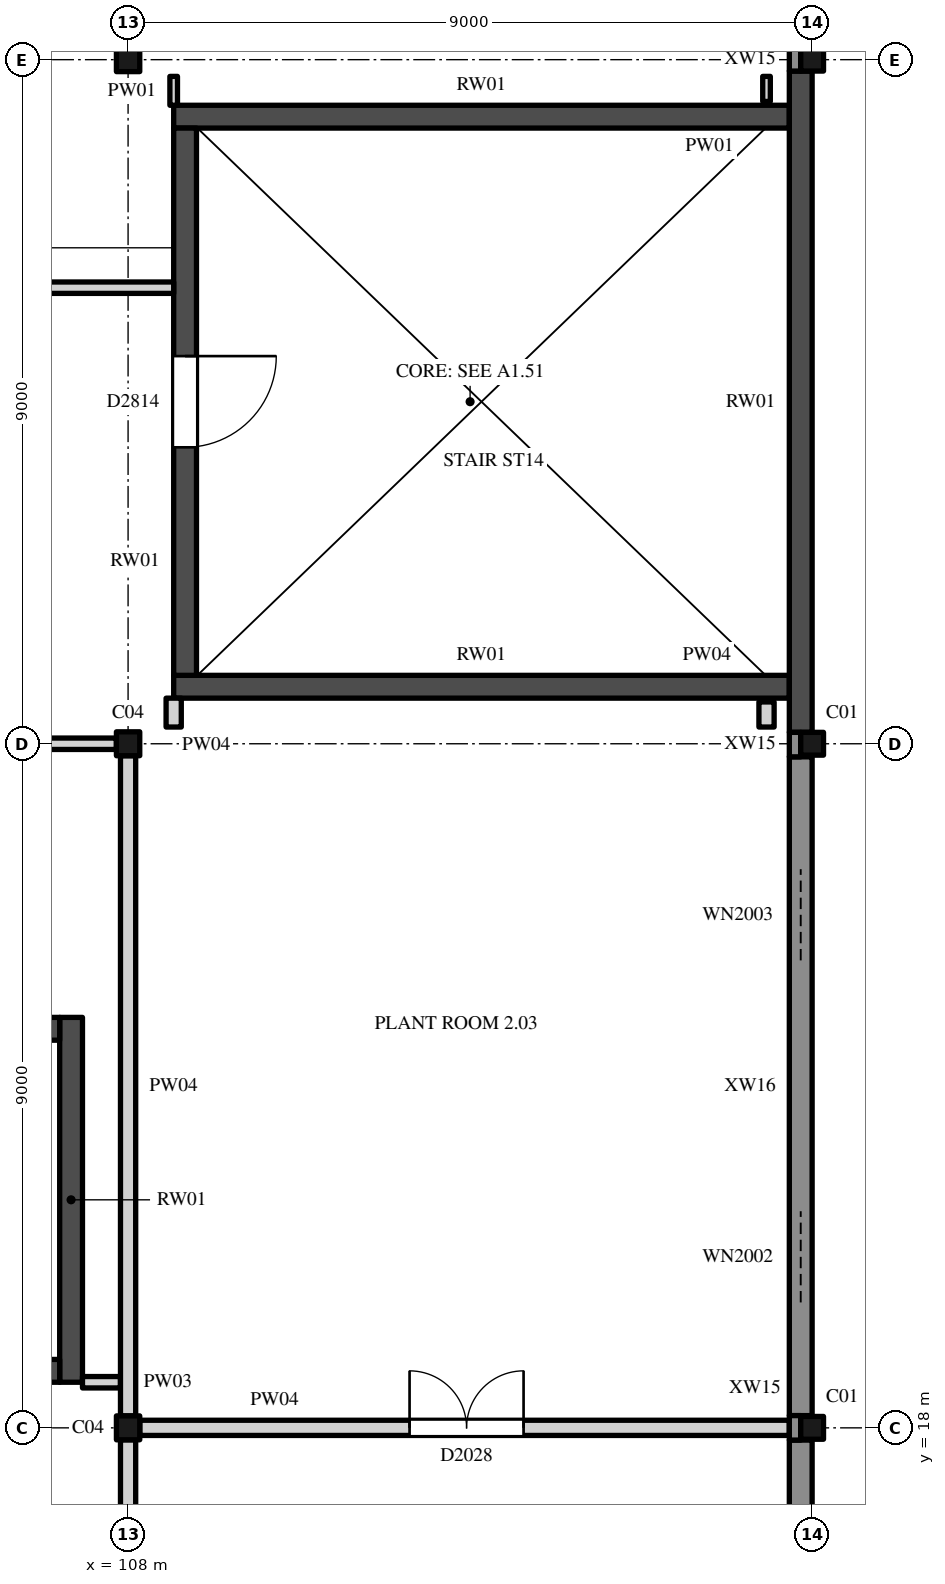
"""IFC4 building model, lengths in metres.
Left out: names, types, materials, properties, quantities, classifications, styles, units other than length and angle.
Written with IfcOpenShell. Run it as: python <this file> out.ifc"""

import sys

from ifc_helpers import new_model, si_unit, direction, frame, frame_2d, origin, origin_2d, place, context, subcontext, project, spatial, rectangle, hollow_rectangle, i_section, extrude, element, fill, save


model = new_model("IFC4")
c1 = context("Model", 3, precision=1e-05, world=origin(), true_north=direction((0.0, 1.0)))
c2 = subcontext(c1, "Body", "Model", "MODEL_VIEW")
j1 = project(units=[si_unit("LENGTHUNIT", "METRE"), si_unit("PLANEANGLEUNIT", "RADIAN")], contexts=[c1])
p1 = place(None, origin())
s1 = spatial("IfcSite", under=j1, at=p1, CompositionType="ELEMENT")
p2 = place(p1, origin())
s2 = spatial("IfcBuilding", under=s1, at=p2, CompositionType="ELEMENT")
p3 = place(p2, frame((0.0, 0.0, 11.0)))
s3 = spatial("IfcBuildingStorey", under=s2, at=p3, CompositionType="ELEMENT", Elevation=11.0)
p4 = place(p3, frame((108.0, 18.0, 0.0), z_axis=(0.0, 0.0, 1.0), x_axis=(1.0, 0.0, 0.0)))
e1 = element("IfcColumn", 1, at=p4, inside=s3, PredefinedType="COLUMN", context=c2, shape_type="SweptSolid", body=[
    extrude(i_section(OverallWidth=0.307, OverallDepth=0.315, WebThickness=0.012, FlangeThickness=0.019, FilletRadius=0.017, at=origin_2d()), origin(), (0.0, 0.0, 1.0), 5.0),
])
p5 = place(p3, frame((117.0, 18.0, 0.0), z_axis=(0.0, 0.0, 1.0), x_axis=(1.0, 0.0, 0.0)))
e2 = element("IfcColumn", 2, at=p5, inside=s3, PredefinedType="COLUMN", context=c2, shape_type="SweptSolid", body=[
    extrude(hollow_rectangle(XDim=0.3, YDim=0.3, WallThickness=0.012, InnerFilletRadius=0.019, OuterFilletRadius=0.031, at=origin_2d()), origin(), (0.0, 0.0, 1.0), 5.0),
])
p6 = place(p3, frame((108.0, 27.0, 0.0), z_axis=(0.0, 0.0, 1.0), x_axis=(1.0, 0.0, 0.0)))
e3 = element("IfcColumn", 3, at=p6, inside=s3, PredefinedType="COLUMN", context=c2, shape_type="SweptSolid", body=[
    extrude(i_section(OverallWidth=0.307, OverallDepth=0.315, WebThickness=0.012, FlangeThickness=0.019, FilletRadius=0.017, at=origin_2d()), origin(), (0.0, 0.0, 1.0), 5.0),
])
p7 = place(p3, frame((117.0, 27.0, 0.0), z_axis=(0.0, 0.0, 1.0), x_axis=(1.0, 0.0, 0.0)))
e4 = element("IfcColumn", 4, at=p7, inside=s3, PredefinedType="COLUMN", context=c2, shape_type="SweptSolid", body=[
    extrude(hollow_rectangle(XDim=0.3, YDim=0.3, WallThickness=0.012, InnerFilletRadius=0.019, OuterFilletRadius=0.031, at=origin_2d()), origin(), (0.0, 0.0, 1.0), 5.0),
])
p8 = place(p3, frame((108.0, 36.0, 0.0), z_axis=(0.0, 0.0, 1.0), x_axis=(1.0, 0.0, 0.0)))
e5 = element("IfcColumn", 5, at=p8, inside=s3, PredefinedType="COLUMN", context=c2, shape_type="SweptSolid", body=[
    extrude(i_section(OverallWidth=0.307, OverallDepth=0.315, WebThickness=0.012, FlangeThickness=0.019, FilletRadius=0.017, at=origin_2d()), origin(), (0.0, 0.0, 1.0), 5.0),
])
p9 = place(p3, frame((117.0, 36.0, 0.0), z_axis=(0.0, 0.0, 1.0), x_axis=(1.0, 0.0, 0.0)))
e6 = element("IfcColumn", 6, at=p9, inside=s3, PredefinedType="COLUMN", context=c2, shape_type="SweptSolid", body=[
    extrude(hollow_rectangle(XDim=0.3, YDim=0.3, WallThickness=0.012, InnerFilletRadius=0.019, OuterFilletRadius=0.031, at=origin_2d()), origin(), (0.0, 0.0, 1.0), 5.0),
])
for number, where, z_axis, x_axis in (
    (7, (108.6, 27.75, 0.0), (0.0, 0.0, 1.0), (1.0, 0.0, 0.0)),
    (8, (108.6, 35.25, 0.0), (0.0, 0.0, 1.0), (1.0, 0.0, 0.0)),
):
    element("IfcWall", number, at=place(p3, frame(where, z_axis=z_axis, x_axis=x_axis)), inside=s3, PredefinedType="SHEAR", context=c2, shape_type="SweptSolid", body=[
        extrude(rectangle(XDim=8.1, YDim=0.3, at=frame_2d((4.05, 0.0))), origin(), (0.0, 0.0, 1.0), 4.825),
    ])
p10 = place(p3, frame((108.75, 27.9, 0.0), z_axis=(0.0, 0.0, 1.0), x_axis=(0.0, 1.0, 0.0)))
e9 = element("IfcWall", 9, at=p10, inside=s3, PredefinedType="SHEAR", context=c2, shape_type="SweptSolid", body=[
    extrude(rectangle(XDim=7.2, YDim=0.3, at=frame_2d((3.6, 0.0))), origin(), (0.0, 0.0, 1.0), 4.825),
])
p11 = place(p10, frame((3.0, 0.0, 0.0)))
e10 = element("IfcOpeningElement", 10, at=p11, cuts=e9, PredefinedType="OPENING", context=c2, shape_type="SweptSolid", body=[
    extrude(rectangle(XDim=1.2, YDim=2.1, at=frame_2d((0.6, 1.05))), frame((0.0, 0.16, 0.0), z_axis=(0.0, -1.0, 0.0), x_axis=(1.0, 0.0, 0.0)), (0.0, 0.0, 1.0), 0.32),
])
p12 = place(p3, frame((116.85, 27.15, 0.0), z_axis=(0.0, 0.0, 1.0), x_axis=(0.0, 1.0, 0.0)))
e11 = element("IfcWall", 11, at=p12, inside=s3, PredefinedType="SHEAR", context=c2, shape_type="SweptSolid", body=[
    extrude(rectangle(XDim=8.7, YDim=0.3, at=frame_2d((4.35, 0.0))), origin(), (0.0, 0.0, 1.0), 4.825),
])
p13 = place(p3, frame((107.25, 18.6, 0.0), z_axis=(0.0, 0.0, 1.0), x_axis=(0.0, 1.0, 0.0)))
e12 = element("IfcWall", 12, at=p13, inside=s3, PredefinedType="SHEAR", context=c2, shape_type="SweptSolid", body=[
    extrude(rectangle(XDim=4.8, YDim=0.3, at=frame_2d((2.4, 0.0))), origin(), (0.0, 0.0, 1.0), 4.825),
])
p14 = place(p3, frame((103.65, 18.75, 0.0), z_axis=(0.0, 0.0, 1.0), x_axis=(1.0, 0.0, 0.0)))
e13 = element("IfcWall", 13, at=p14, inside=s3, PredefinedType="SHEAR", context=c2, shape_type="SweptSolid", body=[
    extrude(rectangle(XDim=3.45, YDim=0.3, at=frame_2d((1.725, 0.0))), origin(), (0.0, 0.0, 1.0), 4.825),
])
p15 = place(p14, frame((0.75, 0.0, 0.0)))
e14 = element("IfcOpeningElement", 14, at=p15, cuts=e13, PredefinedType="OPENING", context=c2, shape_type="SweptSolid", body=[
    extrude(rectangle(XDim=2.1, YDim=2.4, at=frame_2d((1.05, 1.2))), frame((0.0, 0.16, 0.0), z_axis=(0.0, -1.0, 0.0), x_axis=(1.0, 0.0, 0.0)), (0.0, 0.0, 1.0), 0.32),
])
p16 = place(p3, frame((103.65, 23.25, 0.0), z_axis=(0.0, 0.0, 1.0), x_axis=(1.0, 0.0, 0.0)))
e15 = element("IfcWall", 15, at=p16, inside=s3, PredefinedType="SHEAR", context=c2, shape_type="SweptSolid", body=[
    extrude(rectangle(XDim=3.45, YDim=0.3, at=frame_2d((1.725, 0.0))), origin(), (0.0, 0.0, 1.0), 4.825),
])
p17 = place(p3, frame((116.85, 9.172, 0.0), z_axis=(0.0, 0.0, 1.0), x_axis=(0.0, 1.0, 0.0)))
e16 = element("IfcWall", 16, at=p17, inside=s3, PredefinedType="SOLIDWALL", context=c2, shape_type="SweptSolid", body=[
    extrude(rectangle(XDim=8.667, YDim=0.3, at=frame_2d((4.333, 0.0))), origin(), (0.0, 0.0, 1.0), 4.825),
])
p18 = place(p17, frame((3.128, 0.0, 0.9)))
e17 = element("IfcOpeningElement", 17, at=p18, cuts=e16, PredefinedType="OPENING", context=c2, shape_type="SweptSolid", body=[
    extrude(rectangle(XDim=2.4, YDim=1.8, at=frame_2d((1.2, 0.9))), frame((0.0, 0.16, 0.0), z_axis=(0.0, -1.0, 0.0), x_axis=(1.0, 0.0, 0.0)), (0.0, 0.0, 1.0), 0.32),
])
p19 = place(p3, frame((116.85, 18.161, 0.0), z_axis=(0.0, 0.0, 1.0), x_axis=(0.0, 1.0, 0.0)))
e18 = element("IfcWall", 18, at=p19, inside=s3, PredefinedType="SOLIDWALL", context=c2, shape_type="SweptSolid", body=[
    extrude(rectangle(XDim=8.667, YDim=0.3, at=frame_2d((4.333, 0.0))), origin(), (0.0, 0.0, 1.0), 4.825),
])
p20 = place(p19, frame((1.489, 0.0, 1.2)))
e19 = element("IfcOpeningElement", 19, at=p20, cuts=e18, PredefinedType="OPENING", context=c2, shape_type="SweptSolid", body=[
    extrude(rectangle(XDim=1.2, YDim=1.5, at=frame_2d((0.6, 0.75))), frame((0.0, 0.16, 0.0), z_axis=(0.0, -1.0, 0.0), x_axis=(1.0, 0.0, 0.0)), (0.0, 0.0, 1.0), 0.32),
])
p21 = place(p19, frame((5.989, 0.0, 1.2)))
e20 = element("IfcOpeningElement", 20, at=p21, cuts=e18, PredefinedType="OPENING", context=c2, shape_type="SweptSolid", body=[
    extrude(rectangle(XDim=1.2, YDim=1.5, at=frame_2d((0.6, 0.75))), frame((0.0, 0.16, 0.0), z_axis=(0.0, -1.0, 0.0), x_axis=(1.0, 0.0, 0.0)), (0.0, 0.0, 1.0), 0.32),
])
p22 = place(p3, frame((116.775, 17.839, 0.0), z_axis=(0.0, 0.0, 1.0), x_axis=(0.0, 1.0, 0.0)))
e21 = element("IfcWall", 21, at=p22, inside=s3, PredefinedType="SOLIDWALL", context=c2, shape_type="SweptSolid", body=[
    extrude(rectangle(XDim=0.322, YDim=0.15, at=frame_2d((0.161, 0.0))), origin(), (0.0, 0.0, 1.0), 4.825),
])
for number, where, z_axis, x_axis in (
    (22, (116.775, 26.828, 0.0), (0.0, 0.0, 1.0), (0.0, 1.0, 0.0)),
    (23, (116.775, 35.85, 0.0), (0.0, 0.0, 1.0), (0.0, 1.0, 0.0)),
):
    element("IfcWall", number, at=place(p3, frame(where, z_axis=z_axis, x_axis=x_axis)), inside=s3, PredefinedType="SOLIDWALL", context=c2, shape_type="SweptSolid", body=[
        extrude(rectangle(XDim=0.322, YDim=0.15, at=frame_2d((0.161, 0.0))), origin(), (0.0, 0.0, 1.0), 4.825),
    ])
for number, where, z_axis, x_axis in (
    (24, (109.5, 20.325, 5.0), (0.0, 0.0, 1.0), (1.0, 0.0, 0.0)),
    (25, (109.5, 24.675, 5.0), (0.0, 0.0, 1.0), (1.0, 0.0, 0.0)),
):
    element("IfcWall", number, at=place(p3, frame(where, z_axis=z_axis, x_axis=x_axis)), inside=s3, PredefinedType="PARAPET", context=c2, shape_type="SweptSolid", body=[
        extrude(rectangle(XDim=6.0, YDim=0.15, at=frame_2d((3.0, 0.0))), origin(), (0.0, 0.0, 1.0), 0.5),
    ])
for number, where, z_axis, x_axis in (
    (26, (109.575, 20.4, 5.0), (0.0, 0.0, 1.0), (0.0, 1.0, 0.0)),
    (27, (115.425, 20.4, 5.0), (0.0, 0.0, 1.0), (0.0, 1.0, 0.0)),
):
    element("IfcWall", number, at=place(p3, frame(where, z_axis=z_axis, x_axis=x_axis)), inside=s3, PredefinedType="PARAPET", context=c2, shape_type="SweptSolid", body=[
        extrude(rectangle(XDim=4.2, YDim=0.15, at=frame_2d((2.1, 0.0))), origin(), (0.0, 0.0, 1.0), 0.5),
    ])
for number, where, z_axis, x_axis in (
    (28, (109.5, 29.325, 5.0), (0.0, 0.0, 1.0), (1.0, 0.0, 0.0)),
    (29, (109.5, 33.675, 5.0), (0.0, 0.0, 1.0), (1.0, 0.0, 0.0)),
):
    element("IfcWall", number, at=place(p3, frame(where, z_axis=z_axis, x_axis=x_axis)), inside=s3, PredefinedType="PARAPET", context=c2, shape_type="SweptSolid", body=[
        extrude(rectangle(XDim=6.0, YDim=0.15, at=frame_2d((3.0, 0.0))), origin(), (0.0, 0.0, 1.0), 0.5),
    ])
for number, where, z_axis, x_axis in (
    (30, (109.575, 29.4, 5.0), (0.0, 0.0, 1.0), (0.0, 1.0, 0.0)),
    (31, (115.425, 29.4, 5.0), (0.0, 0.0, 1.0), (0.0, 1.0, 0.0)),
):
    element("IfcWall", number, at=place(p3, frame(where, z_axis=z_axis, x_axis=x_axis)), inside=s3, PredefinedType="PARAPET", context=c2, shape_type="SweptSolid", body=[
        extrude(rectangle(XDim=4.2, YDim=0.15, at=frame_2d((2.1, 0.0))), origin(), (0.0, 0.0, 1.0), 0.5),
    ])
p23 = place(p3, frame((108.154, 18.0, 0.0), z_axis=(0.0, 0.0, 1.0), x_axis=(1.0, 0.0, 0.0)))
e32 = element("IfcWall", 32, at=p23, inside=s3, PredefinedType="PARTITIONING", context=c2, shape_type="SweptSolid", body=[
    extrude(rectangle(XDim=8.546, YDim=0.2, at=frame_2d((4.273, 0.0))), origin(), (0.0, 0.0, 1.0), 4.419),
])
p24 = place(p23, frame((3.55, 0.0, 0.0)))
e33 = element("IfcOpeningElement", 33, at=p24, cuts=e32, PredefinedType="OPENING", context=c2, shape_type="SweptSolid", body=[
    extrude(rectangle(XDim=1.5, YDim=2.4, at=frame_2d((0.75, 1.2))), frame((0.0, 0.11, 0.0), z_axis=(0.0, -1.0, 0.0), x_axis=(1.0, 0.0, 0.0)), (0.0, 0.0, 1.0), 0.22),
])
p25 = place(p3, frame((107.4, 18.6, 0.0), z_axis=(0.0, 0.0, 1.0), x_axis=(1.0, 0.0, 0.0)))
e34 = element("IfcWall", 34, at=p25, inside=s3, PredefinedType="PARTITIONING", context=c2, shape_type="SweptSolid", body=[
    extrude(rectangle(XDim=0.5, YDim=0.15, at=frame_2d((0.25, 0.0))), origin(), (0.0, 0.0, 1.0), 4.825),
])
p26 = place(p3, frame((99.154, 27.0, 0.0), z_axis=(0.0, 0.0, 1.0), x_axis=(1.0, 0.0, 0.0)))
e35 = element("IfcWall", 35, at=p26, inside=s3, PredefinedType="PARTITIONING", context=c2, shape_type="SweptSolid", body=[
    extrude(rectangle(XDim=8.693, YDim=0.15, at=frame_2d((4.346, 0.0))), origin(), (0.0, 0.0, 1.0), 4.419),
])
p27 = place(p26, frame((3.75, 0.0, 0.0)))
e36 = element("IfcOpeningElement", 36, at=p27, cuts=e35, PredefinedType="OPENING", context=c2, shape_type="SweptSolid", body=[
    extrude(rectangle(XDim=1.2, YDim=2.4, at=frame_2d((0.6, 1.2))), frame((0.0, 0.085, 0.0), z_axis=(0.0, -1.0, 0.0), x_axis=(1.0, 0.0, 0.0)), (0.0, 0.0, 1.0), 0.17),
])
p28 = place(p3, frame((74.925, 33.0, 0.0), z_axis=(0.0, 0.0, 1.0), x_axis=(1.0, 0.0, 0.0)))
e37 = element("IfcWall", 37, at=p28, inside=s3, PredefinedType="PARTITIONING", context=c2, shape_type="SweptSolid", body=[
    extrude(rectangle(XDim=33.675, YDim=0.15, at=frame_2d((16.837, 0.0))), origin(), (0.0, 0.0, 1.0), 4.422),
])
p29 = place(p28, frame((23.025, 0.0, 0.0)))
e38 = element("IfcOpeningElement", 38, at=p29, cuts=e37, PredefinedType="OPENING", context=c2, shape_type="SweptSolid", body=[
    extrude(rectangle(XDim=2.0, YDim=2.4, at=frame_2d((1.0, 1.2))), frame((0.0, 0.085, 0.0), z_axis=(0.0, -1.0, 0.0), x_axis=(1.0, 0.0, 0.0)), (0.0, 0.0, 1.0), 0.17),
])
p30 = place(p3, frame((108.0, 9.157, 0.0), z_axis=(0.0, 0.0, 1.0), x_axis=(0.0, 1.0, 0.0)))
e39 = element("IfcWall", 39, at=p30, inside=s3, PredefinedType="PARTITIONING", context=c2, shape_type="SweptSolid", body=[
    extrude(rectangle(XDim=8.686, YDim=0.2, at=frame_2d((4.343, 0.0))), origin(), (0.0, 0.0, 1.0), 4.297),
])
p31 = place(p30, frame((3.55, 0.0, 0.0)))
e40 = element("IfcOpeningElement", 40, at=p31, cuts=e39, PredefinedType="OPENING", context=c2, shape_type="SweptSolid", body=[
    extrude(rectangle(XDim=1.5, YDim=2.4, at=frame_2d((0.75, 1.2))), frame((0.0, 0.11, 0.0), z_axis=(0.0, -1.0, 0.0), x_axis=(1.0, 0.0, 0.0)), (0.0, 0.0, 1.0), 0.22),
])
p32 = place(p3, frame((108.0, 18.157, 0.0), z_axis=(0.0, 0.0, 1.0), x_axis=(0.0, 1.0, 0.0)))
e41 = element("IfcWall", 41, at=p32, inside=s3, PredefinedType="PARTITIONING", context=c2, shape_type="SweptSolid", body=[
    extrude(rectangle(XDim=8.686, YDim=0.2, at=frame_2d((4.343, 0.0))), origin(), (0.0, 0.0, 1.0), 4.297),
])
p33 = place(p3, frame((108.6, 27.22, 0.0), z_axis=(0.0, 0.0, 1.0), x_axis=(0.0, 1.0, 0.0)))
e42 = element("IfcWall", 42, at=p33, inside=s3, PredefinedType="PARTITIONING", context=c2, shape_type="SweptSolid", body=[
    extrude(rectangle(XDim=0.38, YDim=0.2, at=frame_2d((0.19, 0.0))), origin(), (0.0, 0.0, 1.0), 4.825),
])
p34 = place(p3, frame((108.6, 35.4, 0.0), z_axis=(0.0, 0.0, 1.0), x_axis=(0.0, 1.0, 0.0)))
e43 = element("IfcWall", 43, at=p34, inside=s3, PredefinedType="PARTITIONING", context=c2, shape_type="SweptSolid", body=[
    extrude(rectangle(XDim=0.38, YDim=0.1, at=frame_2d((0.19, 0.0))), origin(), (0.0, 0.0, 1.0), 4.825),
])
p35 = place(p3, frame((116.4, 27.22, 0.0), z_axis=(0.0, 0.0, 1.0), x_axis=(0.0, 1.0, 0.0)))
e44 = element("IfcWall", 44, at=p35, inside=s3, PredefinedType="PARTITIONING", context=c2, shape_type="SweptSolid", body=[
    extrude(rectangle(XDim=0.33, YDim=0.2, at=frame_2d((0.165, 0.0))), origin(), (0.0, 0.0, 1.0), 4.825),
])
p36 = place(p3, frame((116.4, 35.45, 0.0), z_axis=(0.0, 0.0, 1.0), x_axis=(0.0, 1.0, 0.0)))
e45 = element("IfcWall", 45, at=p36, inside=s3, PredefinedType="PARTITIONING", context=c2, shape_type="SweptSolid", body=[
    extrude(rectangle(XDim=0.33, YDim=0.1, at=frame_2d((0.165, 0.0))), origin(), (0.0, 0.0, 1.0), 4.825),
])
p37 = place(p11, origin())
e46 = element("IfcDoor", 46, at=p37, inside=s3, OperationType="SINGLE_SWING_RIGHT", PredefinedType="DOOR", context=c2, shape_type="SweptSolid", body=[
    extrude(rectangle(XDim=1.2, YDim=2.1, at=frame_2d((0.6, 1.05))), frame((0.0, 0.025, 0.0), z_axis=(0.0, -1.0, 0.0), x_axis=(1.0, 0.0, 0.0)), (0.0, 0.0, 1.0), 0.05),
])
fill(e10, e46)
p38 = place(p20, origin())
e47 = element("IfcWindow", 47, at=p38, inside=s3, PartitioningType="SINGLE_PANEL", PredefinedType="WINDOW", context=c2, shape_type="SweptSolid", body=[
    extrude(rectangle(XDim=1.2, YDim=1.5, at=frame_2d((0.6, 0.75))), frame((0.0, 0.03, 0.0), z_axis=(0.0, -1.0, 0.0), x_axis=(1.0, 0.0, 0.0)), (0.0, 0.0, 1.0), 0.06),
])
fill(e19, e47)
p39 = place(p21, origin())
e48 = element("IfcWindow", 48, at=p39, inside=s3, PartitioningType="SINGLE_PANEL", PredefinedType="WINDOW", context=c2, shape_type="SweptSolid", body=[
    extrude(rectangle(XDim=1.2, YDim=1.5, at=frame_2d((0.6, 0.75))), frame((0.0, 0.03, 0.0), z_axis=(0.0, -1.0, 0.0), x_axis=(1.0, 0.0, 0.0)), (0.0, 0.0, 1.0), 0.06),
])
fill(e20, e48)
p40 = place(p24, origin())
e49 = element("IfcDoor", 49, at=p40, inside=s3, OperationType="DOUBLE_DOOR_SINGLE_SWING", PredefinedType="DOOR", context=c2, shape_type="SweptSolid", body=[
    extrude(rectangle(XDim=1.5, YDim=2.4, at=frame_2d((0.75, 1.2))), frame((0.0, 0.025, 0.0), z_axis=(0.0, -1.0, 0.0), x_axis=(1.0, 0.0, 0.0)), (0.0, 0.0, 1.0), 0.05),
])
fill(e33, e49)
save(model, sys.argv[1])
